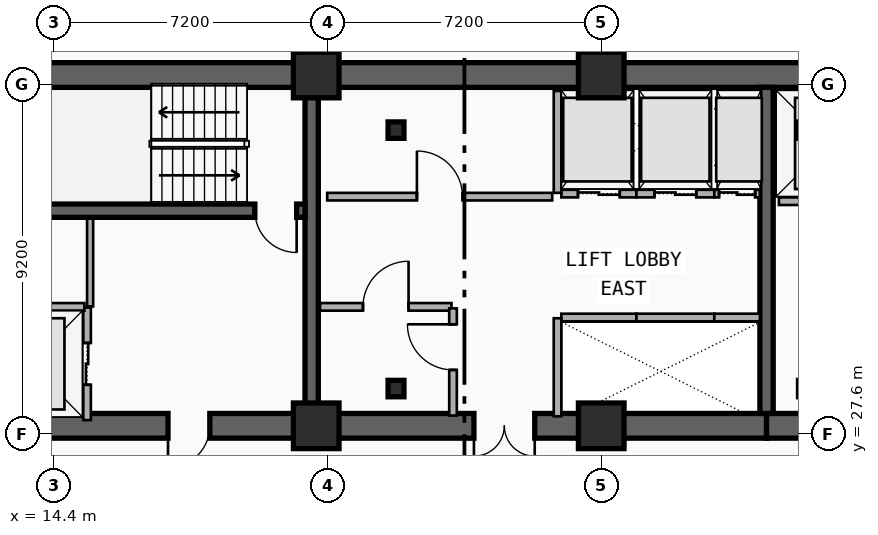
"""IFC4 building model, lengths in metres.
Left out: names, types, materials, properties, quantities, classifications, styles, units other than length and angle.
Written with IfcOpenShell. Run it as: python <this file> out.ifc"""

import sys

from ifc_helpers import new_model, si_unit, direction, frame, frame_2d, origin, origin_2d, place, context, subcontext, project, spatial, rectangle, i_section, extrude, element, fill, save


model = new_model("IFC4")
c1 = context("Model", 3, precision=1e-05, world=origin(), true_north=direction((0.0, 1.0)))
c2 = subcontext(c1, "Body", "Model", "MODEL_VIEW")
j1 = project(units=[si_unit("LENGTHUNIT", "METRE"), si_unit("PLANEANGLEUNIT", "RADIAN")], contexts=[c1])
p1 = place(None, origin())
s1 = spatial("IfcSite", under=j1, at=p1, CompositionType="ELEMENT")
p2 = place(p1, origin())
s2 = spatial("IfcBuilding", under=s1, at=p2, CompositionType="ELEMENT")
p3 = place(p2, frame((0.0, 0.0, 108.3)))
s3 = spatial("IfcBuildingStorey", under=s2, at=p3, CompositionType="ELEMENT", Elevation=108.3)
p4 = place(p3, frame((12.15, 37.05, 0.0), z_axis=(0.0, 0.0, 1.0), x_axis=(1.0, 0.0, 0.0)))
e1 = element("IfcWall", 1, at=p4, inside=s3, PredefinedType="SHEAR", context=c2, shape_type="SweptSolid", body=[
    extrude(rectangle(XDim=33.23, YDim=0.65, at=frame_2d((16.615, 0.0))), origin(), (0.0, 0.0, 1.0), 3.5),
])
p5 = place(p3, frame((21.18, 27.82, 0.0), z_axis=(0.0, 0.0, 1.0), x_axis=(-1.0, 0.0, 0.0)))
e2 = element("IfcWall", 2, at=p5, inside=s3, PredefinedType="SHEAR", context=c2, shape_type="SweptSolid", body=[
    extrude(rectangle(XDim=9.03, YDim=0.65, at=frame_2d((4.515, 0.0))), origin(), (0.0, 0.0, 1.0), 3.5),
])
p6 = place(p5, frame((2.68, 0.0, 0.0)))
e3 = element("IfcOpeningElement", 3, at=p6, cuts=e2, PredefinedType="OPENING", context=c2, shape_type="SweptSolid", body=[
    extrude(rectangle(XDim=1.1, YDim=2.15, at=frame_2d((0.55, 1.075))), frame((0.0, 0.335, 0.0), z_axis=(0.0, -1.0, 0.0), x_axis=(1.0, 0.0, 0.0)), (0.0, 0.0, 1.0), 0.67),
])
p7 = place(p3, frame((33.15, 27.82, 0.0), z_axis=(0.0, 0.0, 1.0), x_axis=(-1.0, 0.0, 0.0)))
e4 = element("IfcWall", 4, at=p7, inside=s3, PredefinedType="SHEAR", context=c2, shape_type="SweptSolid", body=[
    extrude(rectangle(XDim=11.97, YDim=0.65, at=frame_2d((5.985, 0.0))), origin(), (0.0, 0.0, 1.0), 3.5),
])
p8 = place(p7, frame((6.1, 0.0, 0.0)))
e5 = element("IfcOpeningElement", 5, at=p8, cuts=e4, PredefinedType="OPENING", context=c2, shape_type="SweptSolid", body=[
    extrude(rectangle(XDim=1.6, YDim=2.2, at=frame_2d((0.8, 1.1))), frame((0.0, 0.335, 0.0), z_axis=(0.0, -1.0, 0.0), x_axis=(1.0, 0.0, 0.0)), (0.0, 0.0, 1.0), 0.67),
])
p9 = place(p3, frame((45.38, 27.82, 0.0), z_axis=(0.0, 0.0, 1.0), x_axis=(-1.0, 0.0, 0.0)))
e6 = element("IfcWall", 6, at=p9, inside=s3, PredefinedType="SHEAR", context=c2, shape_type="SweptSolid", body=[
    extrude(rectangle(XDim=12.23, YDim=0.65, at=frame_2d((6.115, 0.0))), origin(), (0.0, 0.0, 1.0), 3.5),
])
p10 = place(p9, frame((9.93, 0.0, 0.0)))
e7 = element("IfcOpeningElement", 7, at=p10, cuts=e6, PredefinedType="OPENING", context=c2, shape_type="SweptSolid", body=[
    extrude(rectangle(XDim=1.1, YDim=2.15, at=frame_2d((0.55, 1.075))), frame((0.0, 0.335, 0.0), z_axis=(0.0, -1.0, 0.0), x_axis=(1.0, 0.0, 0.0)), (0.0, 0.0, 1.0), 0.67),
])
p11 = place(p9, frame((6.23, 0.0, 0.0)))
e8 = element("IfcOpeningElement", 8, at=p11, cuts=e6, PredefinedType="OPENING", context=c2, shape_type="SweptSolid", body=[
    extrude(rectangle(XDim=1.1, YDim=2.15, at=frame_2d((0.55, 1.075))), frame((0.0, 0.335, 0.0), z_axis=(0.0, -1.0, 0.0), x_axis=(1.0, 0.0, 0.0)), (0.0, 0.0, 1.0), 0.67),
])
for number, where, z_axis, x_axis in (
    (9, (21.18, 28.145, 0.0), (0.0, 0.0, 1.0), (0.0, 1.0, 0.0)),
    (10, (33.15, 28.145, 0.0), (0.0, 0.0, 1.0), (0.0, 1.0, 0.0)),
):
    element("IfcWall", number, at=place(p3, frame(where, z_axis=z_axis, x_axis=x_axis)), inside=s3, PredefinedType="SHEAR", context=c2, shape_type="SweptSolid", body=[
        extrude(rectangle(XDim=8.58, YDim=0.35, at=frame_2d((4.29, 0.0))), origin(), (0.0, 0.0, 1.0), 3.5),
    ])
p12 = place(p3, frame((21.005, 33.48, 0.0), z_axis=(0.0, 0.0, 1.0), x_axis=(-1.0, 0.0, 0.0)))
e11 = element("IfcWall", 11, at=p12, inside=s3, PredefinedType="SHEAR", context=c2, shape_type="SweptSolid", body=[
    extrude(rectangle(XDim=8.53, YDim=0.35, at=frame_2d((4.265, 0.0))), origin(), (0.0, 0.0, 1.0), 3.5),
])
p13 = place(p12, frame((0.22, 0.0, 0.0)))
e12 = element("IfcOpeningElement", 12, at=p13, cuts=e11, PredefinedType="OPENING", context=c2, shape_type="SweptSolid", body=[
    extrude(rectangle(XDim=1.1, YDim=2.15, at=frame_2d((0.55, 1.075))), frame((0.0, 0.185, 0.0), z_axis=(0.0, -1.0, 0.0), x_axis=(1.0, 0.0, 0.0)), (0.0, 0.0, 1.0), 0.37),
])
for number, where, z_axis, x_axis in (
    (13, (23.4, 28.8, 0.0), (0.0, 0.0, 1.0), (1.0, 0.0, 0.0)),
    (14, (23.4, 35.6, 0.0), (0.0, 0.0, 1.0), (1.0, 0.0, 0.0)),
):
    element("IfcColumn", number, at=place(p3, frame(where, z_axis=z_axis, x_axis=x_axis)), inside=s3, PredefinedType="COLUMN", context=c2, shape_type="SweptSolid", body=[
        extrude(i_section(OverallWidth=0.418, OverallDepth=0.432, WebThickness=0.035, FlangeThickness=0.056, FilletRadius=0.015, at=origin_2d()), origin(), (0.0, 0.0, 1.0), 3.5),
    ])
for number, where, z_axis, x_axis in (
    (15, (21.3, 27.82, 0.0), (0.0, 0.0, 1.0), (1.0, 0.0, 0.0)),
    (16, (21.3, 37.05, 0.0), (0.0, 0.0, 1.0), (1.0, 0.0, 0.0)),
    (17, (28.8, 27.82, 0.0), (0.0, 0.0, 1.0), (1.0, 0.0, 0.0)),
    (18, (28.8, 37.05, 0.0), (0.0, 0.0, 1.0), (1.0, 0.0, 0.0)),
):
    element("IfcColumn", number, at=place(p3, frame(where, z_axis=z_axis, x_axis=x_axis)), inside=s3, PredefinedType="COLUMN", context=c2, shape_type="SweptSolid", body=[
        extrude(rectangle(XDim=1.2, YDim=1.2, at=origin_2d()), origin(), (0.0, 0.0, 1.0), 3.5),
    ])
p14 = place(p3, frame((15.27, 27.97, 0.0), z_axis=(0.0, 0.0, 1.0), x_axis=(0.0, 1.0, 0.0)))
e19 = element("IfcWall", 19, at=p14, inside=s3, PredefinedType="PARTITIONING", context=c2, shape_type="SweptSolid", body=[
    extrude(rectangle(XDim=2.96, YDim=0.2, at=frame_2d((1.48, 0.0))), origin(), (0.0, 0.0, 1.0), 2.212),
])
p15 = place(p14, frame((0.93, 0.0, 0.0)))
e20 = element("IfcOpeningElement", 20, at=p15, cuts=e19, PredefinedType="OPENING", context=c2, shape_type="SweptSolid", body=[
    extrude(rectangle(XDim=1.1, YDim=2.15, at=frame_2d((0.55, 1.075))), frame((0.0, 0.11, 0.0), z_axis=(0.0, -1.0, 0.0), x_axis=(1.0, 0.0, 0.0)), (0.0, 0.0, 1.0), 0.22),
])
p16 = place(p3, frame((12.45, 30.95, 0.0), z_axis=(0.0, 0.0, 1.0), x_axis=(1.0, 0.0, 0.0)))
e21 = element("IfcWall", 21, at=p16, inside=s3, PredefinedType="PARTITIONING", context=c2, shape_type="SweptSolid", body=[
    extrude(rectangle(XDim=2.75, YDim=0.2, at=frame_2d((1.375, 0.0))), origin(), (0.0, 0.0, 1.0), 2.212),
])
p17 = place(p3, frame((33.475, 33.73, 0.0), z_axis=(0.0, 0.0, 1.0), x_axis=(1.0, 0.0, 0.0)))
e22 = element("IfcWall", 22, at=p17, inside=s3, PredefinedType="PARTITIONING", context=c2, shape_type="SweptSolid", body=[
    extrude(rectangle(XDim=2.725, YDim=0.2, at=frame_2d((1.362, 0.0))), origin(), (0.0, 0.0, 1.0), 2.212),
])
p18 = place(p17, frame((0.812, 0.0, 0.0)))
e23 = element("IfcOpeningElement", 23, at=p18, cuts=e22, PredefinedType="OPENING", context=c2, shape_type="SweptSolid", body=[
    extrude(rectangle(XDim=1.1, YDim=2.15, at=frame_2d((0.55, 1.075))), frame((0.0, 0.11, 0.0), z_axis=(0.0, -1.0, 0.0), x_axis=(1.0, 0.0, 0.0)), (0.0, 0.0, 1.0), 0.22),
])
p19 = place(p3, frame((27.75, 30.67, 0.0), z_axis=(0.0, 0.0, 1.0), x_axis=(1.0, 0.0, 0.0)))
e24 = element("IfcWall", 24, at=p19, inside=s3, PredefinedType="PARTITIONING", context=c2, shape_type="SweptSolid", body=[
    extrude(rectangle(XDim=1.975, YDim=0.2, at=frame_2d((0.988, 0.0))), origin(), (0.0, 0.0, 1.0), 2.212),
])
p20 = place(p3, frame((27.65, 28.07, 0.0), z_axis=(0.0, 0.0, 1.0), x_axis=(0.0, 1.0, 0.0)))
e25 = element("IfcWall", 25, at=p20, inside=s3, PredefinedType="PARTITIONING", context=c2, shape_type="SweptSolid", body=[
    extrude(rectangle(XDim=2.58, YDim=0.2, at=frame_2d((1.29, 0.0))), origin(), (0.0, 0.0, 1.0), 2.212),
])
p21 = place(p3, frame((29.725, 30.67, 0.0), z_axis=(0.0, 0.0, 1.0), x_axis=(1.0, 0.0, 0.0)))
e26 = element("IfcWall", 26, at=p21, inside=s3, PredefinedType="PARTITIONING", context=c2, shape_type="SweptSolid", body=[
    extrude(rectangle(XDim=2.05, YDim=0.2, at=frame_2d((1.025, 0.0))), origin(), (0.0, 0.0, 1.0), 2.62),
])
p22 = place(p3, frame((31.775, 30.67, 0.0), z_axis=(0.0, 0.0, 1.0), x_axis=(1.0, 0.0, 0.0)))
e27 = element("IfcWall", 27, at=p22, inside=s3, PredefinedType="PARTITIONING", context=c2, shape_type="SweptSolid", body=[
    extrude(rectangle(XDim=1.2, YDim=0.2, at=frame_2d((0.6, 0.0))), origin(), (0.0, 0.0, 1.0), 2.62),
])
p23 = place(p3, frame((27.75, 33.93, 0.0), z_axis=(0.0, 0.0, 1.0), x_axis=(1.0, 0.0, 0.0)))
e28 = element("IfcWall", 28, at=p23, inside=s3, PredefinedType="PARTITIONING", context=c2, shape_type="SweptSolid", body=[
    extrude(rectangle(XDim=1.975, YDim=0.2, at=frame_2d((0.988, 0.0))), origin(), (0.0, 0.0, 1.0), 2.212),
])
p24 = place(p23, frame((0.438, 0.0, 0.0)))
e29 = element("IfcOpeningElement", 29, at=p24, cuts=e28, PredefinedType="OPENING", context=c2, shape_type="SweptSolid", body=[
    extrude(rectangle(XDim=1.1, YDim=2.15, at=frame_2d((0.55, 1.075))), frame((0.0, 0.11, 0.0), z_axis=(0.0, -1.0, 0.0), x_axis=(1.0, 0.0, 0.0)), (0.0, 0.0, 1.0), 0.22),
])
p25 = place(p3, frame((27.65, 33.95, 0.0), z_axis=(0.0, 0.0, 1.0), x_axis=(0.0, 1.0, 0.0)))
e30 = element("IfcWall", 30, at=p25, inside=s3, PredefinedType="PARTITIONING", context=c2, shape_type="SweptSolid", body=[
    extrude(rectangle(XDim=2.68, YDim=0.2, at=frame_2d((1.34, 0.0))), origin(), (0.0, 0.0, 1.0), 2.212),
])
p26 = place(p3, frame((29.725, 33.93, 0.0), z_axis=(0.0, 0.0, 1.0), x_axis=(1.0, 0.0, 0.0)))
e31 = element("IfcWall", 31, at=p26, inside=s3, PredefinedType="PARTITIONING", context=c2, shape_type="SweptSolid", body=[
    extrude(rectangle(XDim=2.05, YDim=0.2, at=frame_2d((1.025, 0.0))), origin(), (0.0, 0.0, 1.0), 3.24),
])
p27 = place(p26, frame((0.475, 0.0, 0.0)))
e32 = element("IfcOpeningElement", 32, at=p27, cuts=e31, PredefinedType="OPENING", context=c2, shape_type="SweptSolid", body=[
    extrude(rectangle(XDim=1.1, YDim=2.15, at=frame_2d((0.55, 1.075))), frame((0.0, 0.11, 0.0), z_axis=(0.0, -1.0, 0.0), x_axis=(1.0, 0.0, 0.0)), (0.0, 0.0, 1.0), 0.22),
])
p28 = place(p3, frame((31.775, 33.93, 0.0), z_axis=(0.0, 0.0, 1.0), x_axis=(1.0, 0.0, 0.0)))
e33 = element("IfcWall", 33, at=p28, inside=s3, PredefinedType="PARTITIONING", context=c2, shape_type="SweptSolid", body=[
    extrude(rectangle(XDim=1.2, YDim=0.2, at=frame_2d((0.6, 0.0))), origin(), (0.0, 0.0, 1.0), 3.24),
])
p29 = place(p28, frame((0.125, 0.0, 0.0)))
e34 = element("IfcOpeningElement", 34, at=p29, cuts=e33, PredefinedType="OPENING", context=c2, shape_type="SweptSolid", body=[
    extrude(rectangle(XDim=0.95, YDim=2.15, at=frame_2d((0.475, 1.075))), frame((0.0, 0.11, 0.0), z_axis=(0.0, -1.0, 0.0), x_axis=(1.0, 0.0, 0.0)), (0.0, 0.0, 1.0), 0.22),
])
p30 = place(p3, frame((21.4, 30.95, 0.0), z_axis=(0.0, 0.0, 1.0), x_axis=(1.0, 0.0, 0.0)))
e35 = element("IfcWall", 35, at=p30, inside=s3, PredefinedType="PARTITIONING", context=c2, shape_type="SweptSolid", body=[
    extrude(rectangle(XDim=3.46, YDim=0.2, at=frame_2d((1.73, 0.0))), origin(), (0.0, 0.0, 1.0), 2.28),
])
p31 = place(p30, frame((1.13, 0.0, 0.0)))
e36 = element("IfcOpeningElement", 36, at=p31, cuts=e35, PredefinedType="OPENING", context=c2, shape_type="SweptSolid", body=[
    extrude(rectangle(XDim=1.2, YDim=2.15, at=frame_2d((0.6, 1.075))), frame((0.0, 0.11, 0.0), z_axis=(0.0, -1.0, 0.0), x_axis=(1.0, 0.0, 0.0)), (0.0, 0.0, 1.0), 0.22),
])
p32 = place(p3, frame((21.59, 33.85, 0.0), z_axis=(0.0, 0.0, 1.0), x_axis=(1.0, 0.0, 0.0)))
e37 = element("IfcWall", 37, at=p32, inside=s3, PredefinedType="PARTITIONING", context=c2, shape_type="SweptSolid", body=[
    extrude(rectangle(XDim=5.92, YDim=0.2, at=frame_2d((2.96, 0.0))), origin(), (0.0, 0.0, 1.0), 2.28),
])
p33 = place(p32, frame((2.36, 0.0, 0.0)))
e38 = element("IfcOpeningElement", 38, at=p33, cuts=e37, PredefinedType="OPENING", context=c2, shape_type="SweptSolid", body=[
    extrude(rectangle(XDim=1.2, YDim=2.15, at=frame_2d((0.6, 1.075))), frame((0.0, 0.11, 0.0), z_axis=(0.0, -1.0, 0.0), x_axis=(1.0, 0.0, 0.0)), (0.0, 0.0, 1.0), 0.22),
])
p34 = place(p3, frame((24.9, 28.09, 0.0), z_axis=(0.0, 0.0, 1.0), x_axis=(0.0, 1.0, 0.0)))
e39 = element("IfcWall", 39, at=p34, inside=s3, PredefinedType="PARTITIONING", context=c2, shape_type="SweptSolid", body=[
    extrude(rectangle(XDim=2.82, YDim=0.2, at=frame_2d((1.41, 0.0))), origin(), (0.0, 0.0, 1.0), 2.62),
])
p35 = place(p34, frame((1.201, 0.0, 0.0)))
e40 = element("IfcOpeningElement", 40, at=p35, cuts=e39, PredefinedType="OPENING", context=c2, shape_type="SweptSolid", body=[
    extrude(rectangle(XDim=1.2, YDim=2.15, at=frame_2d((0.6, 1.075))), frame((0.0, 0.11, 0.0), z_axis=(0.0, -1.0, 0.0), x_axis=(1.0, 0.0, 0.0)), (0.0, 0.0, 1.0), 0.22),
])
p36 = place(p3, frame((15.35, 30.96, 0.0), z_axis=(0.0, 0.0, 1.0), x_axis=(0.0, 1.0, 0.0)))
e41 = element("IfcWall", 41, at=p36, inside=s3, PredefinedType="PARTITIONING", context=c2, shape_type="SweptSolid", body=[
    extrude(rectangle(XDim=2.31, YDim=0.16, at=frame_2d((1.155, 0.0))), origin(), (0.0, 0.0, 1.0), 3.24),
])
p37 = place(p15, origin())
e42 = element("IfcDoor", 42, at=p37, inside=s3, OperationType="DOUBLE_DOOR_SLIDING", PredefinedType="DOOR", context=c2, shape_type="SweptSolid", body=[
    extrude(rectangle(XDim=1.1, YDim=2.15, at=frame_2d((0.55, 1.075))), frame((0.0, 0.025, 0.0), z_axis=(0.0, -1.0, 0.0), x_axis=(1.0, 0.0, 0.0)), (0.0, 0.0, 1.0), 0.05),
])
fill(e20, e42)
p38 = place(p24, origin())
e43 = element("IfcDoor", 43, at=p38, inside=s3, OperationType="DOUBLE_DOOR_SLIDING", PredefinedType="DOOR", context=c2, shape_type="SweptSolid", body=[
    extrude(rectangle(XDim=1.1, YDim=2.15, at=frame_2d((0.55, 1.075))), frame((0.0, 0.025, 0.0), z_axis=(0.0, -1.0, 0.0), x_axis=(1.0, 0.0, 0.0)), (0.0, 0.0, 1.0), 0.05),
])
fill(e29, e43)
p39 = place(p27, origin())
e44 = element("IfcDoor", 44, at=p39, inside=s3, OperationType="DOUBLE_DOOR_SLIDING", PredefinedType="DOOR", context=c2, shape_type="SweptSolid", body=[
    extrude(rectangle(XDim=1.1, YDim=2.15, at=frame_2d((0.55, 1.075))), frame((0.0, 0.025, 0.0), z_axis=(0.0, -1.0, 0.0), x_axis=(1.0, 0.0, 0.0)), (0.0, 0.0, 1.0), 0.05),
])
fill(e32, e44)
p40 = place(p29, origin())
e45 = element("IfcDoor", 45, at=p40, inside=s3, OperationType="DOUBLE_DOOR_SLIDING", PredefinedType="DOOR", context=c2, shape_type="SweptSolid", body=[
    extrude(rectangle(XDim=0.95, YDim=2.15, at=frame_2d((0.475, 1.075))), frame((0.0, 0.025, 0.0), z_axis=(0.0, -1.0, 0.0), x_axis=(1.0, 0.0, 0.0)), (0.0, 0.0, 1.0), 0.05),
])
fill(e34, e45)
p41 = place(p13, origin())
e46 = element("IfcDoor", 46, at=p41, inside=s3, OperationType="SINGLE_SWING_LEFT", PredefinedType="DOOR", context=c2, shape_type="SweptSolid", body=[
    extrude(rectangle(XDim=1.1, YDim=2.15, at=frame_2d((0.55, 1.075))), frame((0.0, 0.025, 0.0), z_axis=(0.0, -1.0, 0.0), x_axis=(1.0, 0.0, 0.0)), (0.0, 0.0, 1.0), 0.05),
])
fill(e12, e46)
p42 = place(p6, origin())
e47 = element("IfcDoor", 47, at=p42, inside=s3, OperationType="SINGLE_SWING_RIGHT", PredefinedType="DOOR", context=c2, shape_type="SweptSolid", body=[
    extrude(rectangle(XDim=1.1, YDim=2.15, at=frame_2d((0.55, 1.075))), frame((0.0, 0.025, 0.0), z_axis=(0.0, -1.0, 0.0), x_axis=(1.0, 0.0, 0.0)), (0.0, 0.0, 1.0), 0.05),
])
fill(e3, e47)
p43 = place(p8, origin())
e48 = element("IfcDoor", 48, at=p43, inside=s3, OperationType="SINGLE_SWING_LEFT", PredefinedType="DOOR", context=c2, shape_type="SweptSolid", body=[
    extrude(rectangle(XDim=1.6, YDim=2.2, at=frame_2d((0.8, 1.1))), frame((0.0, 0.025, 0.0), z_axis=(0.0, -1.0, 0.0), x_axis=(1.0, 0.0, 0.0)), (0.0, 0.0, 1.0), 0.05),
])
fill(e5, e48)
p44 = place(p31, origin())
e49 = element("IfcDoor", 49, at=p44, inside=s3, OperationType="SINGLE_SWING_RIGHT", PredefinedType="DOOR", context=c2, shape_type="SweptSolid", body=[
    extrude(rectangle(XDim=1.2, YDim=2.15, at=frame_2d((0.6, 1.075))), frame((0.0, 0.025, 0.0), z_axis=(0.0, -1.0, 0.0), x_axis=(1.0, 0.0, 0.0)), (0.0, 0.0, 1.0), 0.05),
])
fill(e36, e49)
p45 = place(p33, origin())
e50 = element("IfcDoor", 50, at=p45, inside=s3, OperationType="SINGLE_SWING_LEFT", PredefinedType="DOOR", context=c2, shape_type="SweptSolid", body=[
    extrude(rectangle(XDim=1.2, YDim=2.15, at=frame_2d((0.6, 1.075))), frame((0.0, 0.025, 0.0), z_axis=(0.0, -1.0, 0.0), x_axis=(1.0, 0.0, 0.0)), (0.0, 0.0, 1.0), 0.05),
])
fill(e38, e50)
p46 = place(p35, origin())
e51 = element("IfcDoor", 51, at=p46, inside=s3, OperationType="SINGLE_SWING_RIGHT", PredefinedType="DOOR", context=c2, shape_type="SweptSolid", body=[
    extrude(rectangle(XDim=1.2, YDim=2.15, at=frame_2d((0.6, 1.075))), frame((0.0, 0.025, 0.0), z_axis=(0.0, -1.0, 0.0), x_axis=(1.0, 0.0, 0.0)), (0.0, 0.0, 1.0), 0.05),
])
fill(e40, e51)
save(model, sys.argv[1])
